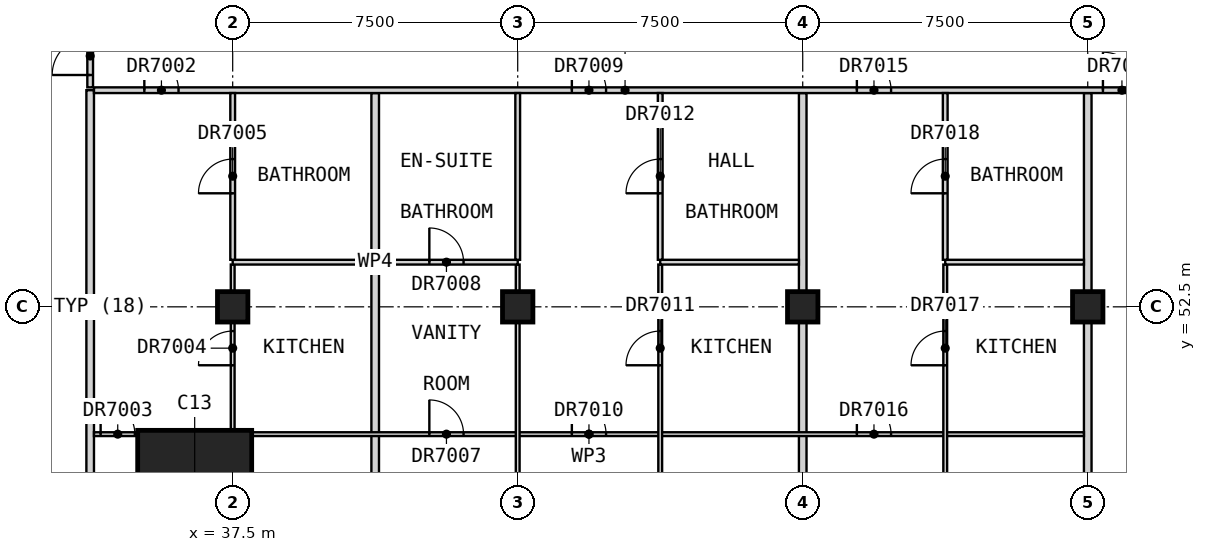
"""IFC4 building model, lengths in metres.
Left out: names, types, materials, properties, quantities, classifications, styles, units other than length and angle.
Written with IfcOpenShell. Run it as: python <this file> out.ifc"""

import sys

from ifc_helpers import new_model, si_unit, direction, frame, frame_2d, origin, origin_2d, place, context, subcontext, project, spatial, rectangle, extrude, element, fill, save


model = new_model("IFC4")
c1 = context("Model", 3, precision=1e-05, world=origin(), true_north=direction((0.0, 1.0)))
c2 = subcontext(c1, "Body", "Model", "MODEL_VIEW")
j1 = project(units=[si_unit("LENGTHUNIT", "METRE"), si_unit("PLANEANGLEUNIT", "RADIAN")], contexts=[c1])
p1 = place(None, origin())
s1 = spatial("IfcSite", under=j1, at=p1, CompositionType="ELEMENT")
p2 = place(p1, origin())
s2 = spatial("IfcBuilding", under=s1, at=p2, CompositionType="ELEMENT")
p3 = place(p2, frame((0.0, 0.0, 230.2)))
s3 = spatial("IfcBuildingStorey", under=s2, at=p3, CompositionType="ELEMENT", Elevation=230.2)
for number, where, z_axis, x_axis in (
    (1, (37.5, 52.5, 0.0), (0.0, 0.0, 1.0), (1.0, 0.0, 0.0)),
    (2, (45.0, 52.5, 0.0), (0.0, 0.0, 1.0), (1.0, 0.0, 0.0)),
    (3, (52.5, 52.5, 0.0), (0.0, 0.0, 1.0), (1.0, 0.0, 0.0)),
    (4, (60.0, 52.5, 0.0), (0.0, 0.0, 1.0), (1.0, 0.0, 0.0)),
):
    element("IfcColumn", number, at=place(p3, frame(where, z_axis=z_axis, x_axis=x_axis)), inside=s3, PredefinedType="COLUMN", context=c2, shape_type="SweptSolid", body=[
        extrude(rectangle(XDim=0.8, YDim=0.8, at=origin_2d()), origin(), (0.0, 0.0, 1.0), 3.5),
    ])
p4 = place(p3, frame((36.5, 47.75, 0.0), z_axis=(0.0, 0.0, 1.0), x_axis=(1.0, 0.0, 0.0)))
e5 = element("IfcColumn", 5, at=p4, inside=s3, PredefinedType="COLUMN", context=c2, shape_type="SweptSolid", body=[
    extrude(rectangle(XDim=3.0, YDim=3.0, at=origin_2d()), origin(), (0.0, 0.0, 1.0), 3.5),
])
p5 = place(p3, frame((33.75, 47.06, 0.0), z_axis=(0.0, 0.0, 1.0), x_axis=(0.0, 1.0, 0.0)))
e6 = element("IfcWall", 6, at=p5, inside=s3, PredefinedType="PARTITIONING", context=c2, shape_type="SweptSolid", body=[
    extrude(rectangle(XDim=11.14, YDim=0.2, at=frame_2d((5.57, 0.0))), origin(), (0.0, 0.0, 1.0), 3.25),
])
p6 = place(p3, frame((41.25, 42.06, 0.0), z_axis=(0.0, 0.0, 1.0), x_axis=(0.0, 1.0, 0.0)))
e7 = element("IfcWall", 7, at=p6, inside=s3, PredefinedType="PARTITIONING", context=c2, shape_type="SweptSolid", body=[
    extrude(rectangle(XDim=16.065, YDim=0.2, at=frame_2d((8.032, 0.0))), origin(), (0.0, 0.0, 1.0), 3.25),
])
for number, where, z_axis, x_axis in (
    (8, (52.5, 41.25, 0.0), (0.0, 0.0, 1.0), (0.0, 1.0, 0.0)),
    (9, (60.0, 41.25, 0.0), (0.0, 0.0, 1.0), (0.0, 1.0, 0.0)),
):
    element("IfcWall", number, at=place(p3, frame(where, z_axis=z_axis, x_axis=x_axis)), inside=s3, PredefinedType="PARTITIONING", context=c2, shape_type="SweptSolid", body=[
        extrude(rectangle(XDim=16.875, YDim=0.2, at=frame_2d((8.438, 0.0))), origin(), (0.0, 0.0, 1.0), 3.25),
    ])
p7 = place(p3, frame((33.85, 58.2, 0.0), z_axis=(0.0, 0.0, 1.0), x_axis=(1.0, 0.0, 0.0)))
e10 = element("IfcWall", 10, at=p7, inside=s3, PredefinedType="PARTITIONING", context=c2, shape_type="SweptSolid", body=[
    extrude(rectangle(XDim=27.95, YDim=0.15, at=frame_2d((13.975, 0.0))), origin(), (0.0, 0.0, 1.0), 3.25),
])
p8 = place(p7, frame((1.325, 0.0, 0.0)))
e11 = element("IfcOpeningElement", 11, at=p8, cuts=e10, PredefinedType="OPENING", context=c2, shape_type="SweptSolid", body=[
    extrude(rectangle(XDim=0.9, YDim=2.1, at=frame_2d((0.45, 1.05))), frame((0.0, 0.085, 0.0), z_axis=(0.0, -1.0, 0.0), x_axis=(1.0, 0.0, 0.0)), (0.0, 0.0, 1.0), 0.17),
])
p9 = place(p7, frame((12.575, 0.0, 0.0)))
e12 = element("IfcOpeningElement", 12, at=p9, cuts=e10, PredefinedType="OPENING", context=c2, shape_type="SweptSolid", body=[
    extrude(rectangle(XDim=0.9, YDim=2.1, at=frame_2d((0.45, 1.05))), frame((0.0, 0.085, 0.0), z_axis=(0.0, -1.0, 0.0), x_axis=(1.0, 0.0, 0.0)), (0.0, 0.0, 1.0), 0.17),
])
p10 = place(p7, frame((20.075, 0.0, 0.0)))
e13 = element("IfcOpeningElement", 13, at=p10, cuts=e10, PredefinedType="OPENING", context=c2, shape_type="SweptSolid", body=[
    extrude(rectangle(XDim=0.9, YDim=2.1, at=frame_2d((0.45, 1.05))), frame((0.0, 0.085, 0.0), z_axis=(0.0, -1.0, 0.0), x_axis=(1.0, 0.0, 0.0)), (0.0, 0.0, 1.0), 0.17),
])
p11 = place(p7, frame((26.55, 0.0, 0.0)))
e14 = element("IfcOpeningElement", 14, at=p11, cuts=e10, PredefinedType="OPENING", context=c2, shape_type="SweptSolid", body=[
    extrude(rectangle(XDim=1.0, YDim=2.1, at=frame_2d((0.5, 1.05))), frame((0.0, 0.085, 0.0), z_axis=(0.0, -1.0, 0.0), x_axis=(1.0, 0.0, 0.0)), (0.0, 0.0, 1.0), 0.17),
])
p12 = place(p3, frame((33.75, 58.275, 0.0), z_axis=(0.0, 0.0, 1.0), x_axis=(0.0, 1.0, 0.0)))
e15 = element("IfcWall", 15, at=p12, inside=s3, PredefinedType="PARTITIONING", context=c2, shape_type="SweptSolid", body=[
    extrude(rectangle(XDim=1.725, YDim=0.15, at=frame_2d((0.863, 0.0))), origin(), (0.0, 0.0, 1.0), 3.25),
])
p13 = place(p12, frame((0.325, 0.0, 0.0)))
e16 = element("IfcOpeningElement", 16, at=p13, cuts=e15, PredefinedType="OPENING", context=c2, shape_type="SweptSolid", body=[
    extrude(rectangle(XDim=1.0, YDim=2.1, at=frame_2d((0.5, 1.05))), frame((0.0, 0.085, 0.0), z_axis=(0.0, -1.0, 0.0), x_axis=(1.0, 0.0, 0.0)), (0.0, 0.0, 1.0), 0.17),
])
p14 = place(p3, frame((33.85, 49.15, 0.0), z_axis=(0.0, 0.0, 1.0), x_axis=(1.0, 0.0, 0.0)))
e17 = element("IfcWall", 17, at=p14, inside=s3, PredefinedType="PARTITIONING", context=c2, shape_type="SweptSolid", body=[
    extrude(rectangle(XDim=26.05, YDim=0.1, at=frame_2d((13.025, 0.0))), origin(), (0.0, 0.0, 1.0), 3.25),
])
p15 = place(p14, frame((0.175, 0.0, 0.0)))
e18 = element("IfcOpeningElement", 18, at=p15, cuts=e17, PredefinedType="OPENING", context=c2, shape_type="SweptSolid", body=[
    extrude(rectangle(XDim=0.9, YDim=2.1, at=frame_2d((0.45, 1.05))), frame((0.0, 0.06, 0.0), z_axis=(0.0, -1.0, 0.0), x_axis=(1.0, 0.0, 0.0)), (0.0, 0.0, 1.0), 0.12),
])
p16 = place(p14, frame((8.825, 0.0, 0.0)))
e19 = element("IfcOpeningElement", 19, at=p16, cuts=e17, PredefinedType="OPENING", context=c2, shape_type="SweptSolid", body=[
    extrude(rectangle(XDim=0.9, YDim=2.1, at=frame_2d((0.45, 1.05))), frame((0.0, 0.06, 0.0), z_axis=(0.0, -1.0, 0.0), x_axis=(1.0, 0.0, 0.0)), (0.0, 0.0, 1.0), 0.12),
])
p17 = place(p14, frame((12.575, 0.0, 0.0)))
e20 = element("IfcOpeningElement", 20, at=p17, cuts=e17, PredefinedType="OPENING", context=c2, shape_type="SweptSolid", body=[
    extrude(rectangle(XDim=0.9, YDim=2.1, at=frame_2d((0.45, 1.05))), frame((0.0, 0.06, 0.0), z_axis=(0.0, -1.0, 0.0), x_axis=(1.0, 0.0, 0.0)), (0.0, 0.0, 1.0), 0.12),
])
p18 = place(p14, frame((20.075, 0.0, 0.0)))
e21 = element("IfcOpeningElement", 21, at=p18, cuts=e17, PredefinedType="OPENING", context=c2, shape_type="SweptSolid", body=[
    extrude(rectangle(XDim=0.9, YDim=2.1, at=frame_2d((0.45, 1.05))), frame((0.0, 0.06, 0.0), z_axis=(0.0, -1.0, 0.0), x_axis=(1.0, 0.0, 0.0)), (0.0, 0.0, 1.0), 0.12),
])
p19 = place(p3, frame((37.5, 41.25, 0.0), z_axis=(0.0, 0.0, 1.0), x_axis=(0.0, 1.0, 0.0)))
e22 = element("IfcWall", 22, at=p19, inside=s3, PredefinedType="PARTITIONING", context=c2, shape_type="SweptSolid", body=[
    extrude(rectangle(XDim=12.363, YDim=0.1, at=frame_2d((6.181, 0.0))), origin(), (0.0, 0.0, 1.0), 2.75),
])
p20 = place(p19, frame((9.712, 0.0, 0.0)))
e23 = element("IfcOpeningElement", 23, at=p20, cuts=e22, PredefinedType="OPENING", context=c2, shape_type="SweptSolid", body=[
    extrude(rectangle(XDim=0.9, YDim=2.1, at=frame_2d((0.45, 1.05))), frame((0.0, 0.06, 0.0), z_axis=(0.0, -1.0, 0.0), x_axis=(1.0, 0.0, 0.0)), (0.0, 0.0, 1.0), 0.12),
])
p21 = place(p19, frame((2.9, 0.0, 0.0)))
e24 = element("IfcOpeningElement", 24, at=p21, cuts=e22, PredefinedType="OPENING", context=c2, shape_type="SweptSolid", body=[
    extrude(rectangle(XDim=0.9, YDim=2.1, at=frame_2d((0.45, 1.05))), frame((0.0, 0.06, 0.0), z_axis=(0.0, -1.0, 0.0), x_axis=(1.0, 0.0, 0.0)), (0.0, 0.0, 1.0), 0.12),
])
p22 = place(p3, frame((45.0, 41.25, 0.0), z_axis=(0.0, 0.0, 1.0), x_axis=(0.0, 1.0, 0.0)))
e25 = element("IfcWall", 25, at=p22, inside=s3, PredefinedType="PARTITIONING", context=c2, shape_type="SweptSolid", body=[
    extrude(rectangle(XDim=12.363, YDim=0.1, at=frame_2d((6.181, 0.0))), origin(), (0.0, 0.0, 1.0), 3.25),
])
p23 = place(p22, frame((2.9, 0.0, 0.0)))
e26 = element("IfcOpeningElement", 26, at=p23, cuts=e25, PredefinedType="OPENING", context=c2, shape_type="SweptSolid", body=[
    extrude(rectangle(XDim=0.9, YDim=2.1, at=frame_2d((0.45, 1.05))), frame((0.0, 0.06, 0.0), z_axis=(0.0, -1.0, 0.0), x_axis=(1.0, 0.0, 0.0)), (0.0, 0.0, 1.0), 0.12),
])
p24 = place(p3, frame((48.75, 42.06, 0.0), z_axis=(0.0, 0.0, 1.0), x_axis=(0.0, 1.0, 0.0)))
e27 = element("IfcWall", 27, at=p24, inside=s3, PredefinedType="PARTITIONING", context=c2, shape_type="SweptSolid", body=[
    extrude(rectangle(XDim=11.552, YDim=0.1, at=frame_2d((5.776, 0.0))), origin(), (0.0, 0.0, 1.0), 3.25),
])
p25 = place(p24, frame((8.903, 0.0, 0.0)))
e28 = element("IfcOpeningElement", 28, at=p25, cuts=e27, PredefinedType="OPENING", context=c2, shape_type="SweptSolid", body=[
    extrude(rectangle(XDim=0.9, YDim=2.1, at=frame_2d((0.45, 1.05))), frame((0.0, 0.06, 0.0), z_axis=(0.0, -1.0, 0.0), x_axis=(1.0, 0.0, 0.0)), (0.0, 0.0, 1.0), 0.12),
])
p26 = place(p24, frame((2.69, 0.0, 0.0)))
e29 = element("IfcOpeningElement", 29, at=p26, cuts=e27, PredefinedType="OPENING", context=c2, shape_type="SweptSolid", body=[
    extrude(rectangle(XDim=0.9, YDim=2.1, at=frame_2d((0.45, 1.05))), frame((0.0, 0.06, 0.0), z_axis=(0.0, -1.0, 0.0), x_axis=(1.0, 0.0, 0.0)), (0.0, 0.0, 1.0), 0.12),
])
p27 = place(p3, frame((56.25, 42.06, 0.0), z_axis=(0.0, 0.0, 1.0), x_axis=(0.0, 1.0, 0.0)))
e30 = element("IfcWall", 30, at=p27, inside=s3, PredefinedType="PARTITIONING", context=c2, shape_type="SweptSolid", body=[
    extrude(rectangle(XDim=11.552, YDim=0.1, at=frame_2d((5.776, 0.0))), origin(), (0.0, 0.0, 1.0), 3.25),
])
p28 = place(p27, frame((8.903, 0.0, 0.0)))
e31 = element("IfcOpeningElement", 31, at=p28, cuts=e30, PredefinedType="OPENING", context=c2, shape_type="SweptSolid", body=[
    extrude(rectangle(XDim=0.9, YDim=2.1, at=frame_2d((0.45, 1.05))), frame((0.0, 0.06, 0.0), z_axis=(0.0, -1.0, 0.0), x_axis=(1.0, 0.0, 0.0)), (0.0, 0.0, 1.0), 0.12),
])
p29 = place(p27, frame((2.69, 0.0, 0.0)))
e32 = element("IfcOpeningElement", 32, at=p29, cuts=e30, PredefinedType="OPENING", context=c2, shape_type="SweptSolid", body=[
    extrude(rectangle(XDim=0.9, YDim=2.1, at=frame_2d((0.45, 1.05))), frame((0.0, 0.06, 0.0), z_axis=(0.0, -1.0, 0.0), x_axis=(1.0, 0.0, 0.0)), (0.0, 0.0, 1.0), 0.12),
])
p30 = place(p3, frame((37.5, 53.675, 0.0), z_axis=(0.0, 0.0, 1.0), x_axis=(1.0, 0.0, 0.0)))
e33 = element("IfcWall", 33, at=p30, inside=s3, PredefinedType="PARTITIONING", context=c2, shape_type="SweptSolid", body=[
    extrude(rectangle(XDim=7.5, YDim=0.125, at=frame_2d((3.75, 0.0))), origin(), (0.0, 0.0, 1.0), 3.25),
])
p31 = place(p30, frame((5.175, 0.0, 0.0)))
e34 = element("IfcOpeningElement", 34, at=p31, cuts=e33, PredefinedType="OPENING", context=c2, shape_type="SweptSolid", body=[
    extrude(rectangle(XDim=0.9, YDim=2.1, at=frame_2d((0.45, 1.05))), frame((0.0, 0.073, 0.0), z_axis=(0.0, -1.0, 0.0), x_axis=(1.0, 0.0, 0.0)), (0.0, 0.0, 1.0), 0.145),
])
for number, where, z_axis, x_axis in (
    (35, (48.75, 53.675, 0.0), (0.0, 0.0, 1.0), (1.0, 0.0, 0.0)),
    (36, (56.25, 53.675, 0.0), (0.0, 0.0, 1.0), (1.0, 0.0, 0.0)),
):
    element("IfcWall", number, at=place(p3, frame(where, z_axis=z_axis, x_axis=x_axis)), inside=s3, PredefinedType="PARTITIONING", context=c2, shape_type="SweptSolid", body=[
        extrude(rectangle(XDim=3.65, YDim=0.125, at=frame_2d((1.825, 0.0))), origin(), (0.0, 0.0, 1.0), 3.25),
    ])
p32 = place(p3, frame((37.5, 53.738, 0.0), z_axis=(0.0, 0.0, 1.0), x_axis=(0.0, 1.0, 0.0)))
e37 = element("IfcWall", 37, at=p32, inside=s3, PredefinedType="PARTITIONING", context=c2, shape_type="SweptSolid", body=[
    extrude(rectangle(XDim=4.387, YDim=0.125, at=frame_2d((2.194, 0.0))), origin(), (0.0, 0.0, 1.0), 3.25),
])
p33 = place(p32, frame((1.75, 0.0, 0.0)))
e38 = element("IfcOpeningElement", 38, at=p33, cuts=e37, PredefinedType="OPENING", context=c2, shape_type="SweptSolid", body=[
    extrude(rectangle(XDim=0.9, YDim=2.1, at=frame_2d((0.45, 1.05))), frame((0.0, 0.073, 0.0), z_axis=(0.0, -1.0, 0.0), x_axis=(1.0, 0.0, 0.0)), (0.0, 0.0, 1.0), 0.145),
])
p34 = place(p3, frame((45.0, 53.738, 0.0), z_axis=(0.0, 0.0, 1.0), x_axis=(0.0, 1.0, 0.0)))
e39 = element("IfcWall", 39, at=p34, inside=s3, PredefinedType="PARTITIONING", context=c2, shape_type="SweptSolid", body=[
    extrude(rectangle(XDim=4.387, YDim=0.125, at=frame_2d((2.194, 0.0))), origin(), (0.0, 0.0, 1.0), 3.25),
])
p35 = place(p3, frame((48.75, 53.738, 0.0), z_axis=(0.0, 0.0, 1.0), x_axis=(0.0, 1.0, 0.0)))
e40 = element("IfcWall", 40, at=p35, inside=s3, PredefinedType="PARTITIONING", context=c2, shape_type="SweptSolid", body=[
    extrude(rectangle(XDim=4.387, YDim=0.125, at=frame_2d((2.194, 0.0))), origin(), (0.0, 0.0, 1.0), 3.25),
])
p36 = place(p35, frame((1.75, 0.0, 0.0)))
e41 = element("IfcOpeningElement", 41, at=p36, cuts=e40, PredefinedType="OPENING", context=c2, shape_type="SweptSolid", body=[
    extrude(rectangle(XDim=0.9, YDim=2.1, at=frame_2d((0.45, 1.05))), frame((0.0, 0.073, 0.0), z_axis=(0.0, -1.0, 0.0), x_axis=(1.0, 0.0, 0.0)), (0.0, 0.0, 1.0), 0.145),
])
p37 = place(p3, frame((56.25, 53.738, 0.0), z_axis=(0.0, 0.0, 1.0), x_axis=(0.0, 1.0, 0.0)))
e42 = element("IfcWall", 42, at=p37, inside=s3, PredefinedType="PARTITIONING", context=c2, shape_type="SweptSolid", body=[
    extrude(rectangle(XDim=4.387, YDim=0.125, at=frame_2d((2.194, 0.0))), origin(), (0.0, 0.0, 1.0), 3.25),
])
p38 = place(p37, frame((1.75, 0.0, 0.0)))
e43 = element("IfcOpeningElement", 43, at=p38, cuts=e42, PredefinedType="OPENING", context=c2, shape_type="SweptSolid", body=[
    extrude(rectangle(XDim=0.9, YDim=2.1, at=frame_2d((0.45, 1.05))), frame((0.0, 0.073, 0.0), z_axis=(0.0, -1.0, 0.0), x_axis=(1.0, 0.0, 0.0)), (0.0, 0.0, 1.0), 0.145),
])
p39 = place(p13, origin())
e44 = element("IfcDoor", 44, at=p39, inside=s3, OperationType="SINGLE_SWING_RIGHT", PredefinedType="DOOR", context=c2, shape_type="SweptSolid", body=[
    extrude(rectangle(XDim=1.0, YDim=2.1, at=frame_2d((0.5, 1.05))), frame((0.0, 0.025, 0.0), z_axis=(0.0, -1.0, 0.0), x_axis=(1.0, 0.0, 0.0)), (0.0, 0.0, 1.0), 0.05),
])
fill(e16, e44)
p40 = place(p8, origin())
e45 = element("IfcDoor", 45, at=p40, inside=s3, OperationType="SINGLE_SWING_RIGHT", PredefinedType="DOOR", context=c2, shape_type="SweptSolid", body=[
    extrude(rectangle(XDim=0.9, YDim=2.1, at=frame_2d((0.45, 1.05))), frame((0.0, 0.025, 0.0), z_axis=(0.0, -1.0, 0.0), x_axis=(1.0, 0.0, 0.0)), (0.0, 0.0, 1.0), 0.05),
])
fill(e11, e45)
p41 = place(p15, origin())
e46 = element("IfcDoor", 46, at=p41, inside=s3, OperationType="SINGLE_SWING_LEFT", PredefinedType="DOOR", context=c2, shape_type="SweptSolid", body=[
    extrude(rectangle(XDim=0.9, YDim=2.1, at=frame_2d((0.45, 1.05))), frame((0.0, 0.025, 0.0), z_axis=(0.0, -1.0, 0.0), x_axis=(1.0, 0.0, 0.0)), (0.0, 0.0, 1.0), 0.05),
])
fill(e18, e46)
p42 = place(p20, origin())
e47 = element("IfcDoor", 47, at=p42, inside=s3, OperationType="SINGLE_SWING_LEFT", PredefinedType="DOOR", context=c2, shape_type="SweptSolid", body=[
    extrude(rectangle(XDim=0.9, YDim=2.1, at=frame_2d((0.45, 1.05))), frame((0.0, 0.025, 0.0), z_axis=(0.0, -1.0, 0.0), x_axis=(1.0, 0.0, 0.0)), (0.0, 0.0, 1.0), 0.05),
])
fill(e23, e47)
p43 = place(p33, origin())
e48 = element("IfcDoor", 48, at=p43, inside=s3, OperationType="SINGLE_SWING_RIGHT", PredefinedType="DOOR", context=c2, shape_type="SweptSolid", body=[
    extrude(rectangle(XDim=0.9, YDim=2.1, at=frame_2d((0.45, 1.05))), frame((0.0, 0.025, 0.0), z_axis=(0.0, -1.0, 0.0), x_axis=(1.0, 0.0, 0.0)), (0.0, 0.0, 1.0), 0.05),
])
fill(e38, e48)
p44 = place(p16, origin())
e49 = element("IfcDoor", 49, at=p44, inside=s3, OperationType="SINGLE_SWING_LEFT", PredefinedType="DOOR", context=c2, shape_type="SweptSolid", body=[
    extrude(rectangle(XDim=0.9, YDim=2.1, at=frame_2d((0.45, 1.05))), frame((0.0, 0.025, 0.0), z_axis=(0.0, -1.0, 0.0), x_axis=(1.0, 0.0, 0.0)), (0.0, 0.0, 1.0), 0.05),
])
fill(e19, e49)
p45 = place(p31, origin())
e50 = element("IfcDoor", 50, at=p45, inside=s3, OperationType="SINGLE_SWING_LEFT", PredefinedType="DOOR", context=c2, shape_type="SweptSolid", body=[
    extrude(rectangle(XDim=0.9, YDim=2.1, at=frame_2d((0.45, 1.05))), frame((0.0, 0.025, 0.0), z_axis=(0.0, -1.0, 0.0), x_axis=(1.0, 0.0, 0.0)), (0.0, 0.0, 1.0), 0.05),
])
fill(e34, e50)
p46 = place(p9, origin())
e51 = element("IfcDoor", 51, at=p46, inside=s3, OperationType="SINGLE_SWING_RIGHT", PredefinedType="DOOR", context=c2, shape_type="SweptSolid", body=[
    extrude(rectangle(XDim=0.9, YDim=2.1, at=frame_2d((0.45, 1.05))), frame((0.0, 0.025, 0.0), z_axis=(0.0, -1.0, 0.0), x_axis=(1.0, 0.0, 0.0)), (0.0, 0.0, 1.0), 0.05),
])
fill(e12, e51)
p47 = place(p17, origin())
e52 = element("IfcDoor", 52, at=p47, inside=s3, OperationType="SINGLE_SWING_LEFT", PredefinedType="DOOR", context=c2, shape_type="SweptSolid", body=[
    extrude(rectangle(XDim=0.9, YDim=2.1, at=frame_2d((0.45, 1.05))), frame((0.0, 0.025, 0.0), z_axis=(0.0, -1.0, 0.0), x_axis=(1.0, 0.0, 0.0)), (0.0, 0.0, 1.0), 0.05),
])
fill(e20, e52)
p48 = place(p25, origin())
e53 = element("IfcDoor", 53, at=p48, inside=s3, OperationType="SINGLE_SWING_LEFT", PredefinedType="DOOR", context=c2, shape_type="SweptSolid", body=[
    extrude(rectangle(XDim=0.9, YDim=2.1, at=frame_2d((0.45, 1.05))), frame((0.0, 0.025, 0.0), z_axis=(0.0, -1.0, 0.0), x_axis=(1.0, 0.0, 0.0)), (0.0, 0.0, 1.0), 0.05),
])
fill(e28, e53)
p49 = place(p36, origin())
e54 = element("IfcDoor", 54, at=p49, inside=s3, OperationType="SINGLE_SWING_RIGHT", PredefinedType="DOOR", context=c2, shape_type="SweptSolid", body=[
    extrude(rectangle(XDim=0.9, YDim=2.1, at=frame_2d((0.45, 1.05))), frame((0.0, 0.025, 0.0), z_axis=(0.0, -1.0, 0.0), x_axis=(1.0, 0.0, 0.0)), (0.0, 0.0, 1.0), 0.05),
])
fill(e41, e54)
p50 = place(p10, origin())
e55 = element("IfcDoor", 55, at=p50, inside=s3, OperationType="SINGLE_SWING_RIGHT", PredefinedType="DOOR", context=c2, shape_type="SweptSolid", body=[
    extrude(rectangle(XDim=0.9, YDim=2.1, at=frame_2d((0.45, 1.05))), frame((0.0, 0.025, 0.0), z_axis=(0.0, -1.0, 0.0), x_axis=(1.0, 0.0, 0.0)), (0.0, 0.0, 1.0), 0.05),
])
fill(e13, e55)
p51 = place(p18, origin())
e56 = element("IfcDoor", 56, at=p51, inside=s3, OperationType="SINGLE_SWING_LEFT", PredefinedType="DOOR", context=c2, shape_type="SweptSolid", body=[
    extrude(rectangle(XDim=0.9, YDim=2.1, at=frame_2d((0.45, 1.05))), frame((0.0, 0.025, 0.0), z_axis=(0.0, -1.0, 0.0), x_axis=(1.0, 0.0, 0.0)), (0.0, 0.0, 1.0), 0.05),
])
fill(e21, e56)
p52 = place(p28, origin())
e57 = element("IfcDoor", 57, at=p52, inside=s3, OperationType="SINGLE_SWING_LEFT", PredefinedType="DOOR", context=c2, shape_type="SweptSolid", body=[
    extrude(rectangle(XDim=0.9, YDim=2.1, at=frame_2d((0.45, 1.05))), frame((0.0, 0.025, 0.0), z_axis=(0.0, -1.0, 0.0), x_axis=(1.0, 0.0, 0.0)), (0.0, 0.0, 1.0), 0.05),
])
fill(e31, e57)
p53 = place(p38, origin())
e58 = element("IfcDoor", 58, at=p53, inside=s3, OperationType="SINGLE_SWING_RIGHT", PredefinedType="DOOR", context=c2, shape_type="SweptSolid", body=[
    extrude(rectangle(XDim=0.9, YDim=2.1, at=frame_2d((0.45, 1.05))), frame((0.0, 0.025, 0.0), z_axis=(0.0, -1.0, 0.0), x_axis=(1.0, 0.0, 0.0)), (0.0, 0.0, 1.0), 0.05),
])
fill(e43, e58)
p54 = place(p11, origin())
e59 = element("IfcDoor", 59, at=p54, inside=s3, OperationType="SINGLE_SWING_RIGHT", PredefinedType="DOOR", context=c2, shape_type="SweptSolid", body=[
    extrude(rectangle(XDim=1.0, YDim=2.1, at=frame_2d((0.5, 1.05))), frame((0.0, 0.025, 0.0), z_axis=(0.0, -1.0, 0.0), x_axis=(1.0, 0.0, 0.0)), (0.0, 0.0, 1.0), 0.05),
])
fill(e14, e59)
save(model, sys.argv[1])
